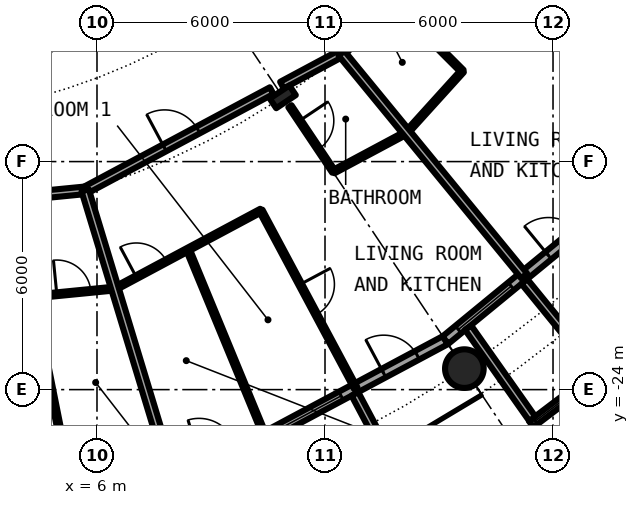
"""IFC4 building model, lengths in metres.
Left out: names, types, materials, properties, quantities, classifications, styles, units other than length and angle.
Written with IfcOpenShell. Run it as: python <this file> out.ifc"""

import sys

from ifc_helpers import new_model, si_unit, direction, frame, frame_2d, origin, origin_2d, place, context, subcontext, project, spatial, rectangle, circle, hollow_circle, i_section, extrude, element, fill, save


model = new_model("IFC4")
c1 = context("Model", 3, precision=1e-05, world=origin(), true_north=direction((0.0, 1.0)))
c2 = subcontext(c1, "Body", "Model", "MODEL_VIEW")
j1 = project(units=[si_unit("LENGTHUNIT", "METRE"), si_unit("PLANEANGLEUNIT", "RADIAN")], contexts=[c1])
p1 = place(None, origin())
s1 = spatial("IfcSite", under=j1, at=p1, CompositionType="ELEMENT")
p2 = place(p1, origin())
s2 = spatial("IfcBuilding", under=s1, at=p2, CompositionType="ELEMENT")
p3 = place(p2, frame((0.0, 0.0, 47.2)))
s3 = spatial("IfcBuildingStorey", under=s2, at=p3, CompositionType="ELEMENT", Elevation=47.2)
p4 = place(p3, frame((15.667, -23.448, 0.0), z_axis=(0.0, 0.0, 1.0), x_axis=(1.0, 0.0, 0.0)))
e1 = element("IfcColumn", 1, at=p4, inside=s3, PredefinedType="COLUMN", context=c2, shape_type="SweptSolid", body=[
    extrude(hollow_circle(Radius=0.508, WallThickness=0.05, at=origin_2d()), origin(), (0.0, 0.0, 1.0), 3.05),
])
p5 = place(p3, frame((10.889, -16.297, 0.0), z_axis=(0.0, 0.0, 1.0), x_axis=(0.55557023302, -0.831469612303, 0.0)))
e2 = element("IfcColumn", 2, at=p5, inside=s3, PredefinedType="COLUMN", context=c2, shape_type="SweptSolid", body=[
    extrude(i_section(OverallWidth=0.305, OverallDepth=0.62, WebThickness=0.021, FlangeThickness=0.04, FilletRadius=0.027, at=origin_2d()), origin(), (0.0, 0.0, 1.0), 3.05),
])
p6 = place(p3, frame((10.447, -25.222, 0.0), z_axis=(0.0, 0.0, 1.0), x_axis=(0.881915646801, 0.471407246368, 0.0)))
e3 = element("IfcWall", 3, at=p6, inside=s3, PredefinedType="SOLIDWALL", context=c2, shape_type="SweptSolid", body=[
    extrude(rectangle(XDim=5.352, YDim=0.25, at=frame_2d((2.676, 0.0))), origin(), (0.0, 0.0, 1.0), 2.7),
])
p7 = place(p6, frame((0.441, 0.0, 0.3)))
e4 = element("IfcOpeningElement", 4, at=p7, cuts=e3, PredefinedType="OPENING", context=c2, shape_type="SweptSolid", body=[
    extrude(rectangle(XDim=1.8, YDim=2.1, at=frame_2d((0.9, 1.05))), frame((0.0, 0.135, 0.0), z_axis=(0.0, -1.0, 0.0), x_axis=(1.0, 0.0, 0.0)), (0.0, 0.0, 1.0), 0.27),
])
p8 = place(p6, frame((3.51, 0.0, 0.0)))
e5 = element("IfcOpeningElement", 5, at=p8, cuts=e3, PredefinedType="OPENING", context=c2, shape_type="SweptSolid", body=[
    extrude(rectangle(XDim=1.0, YDim=2.2, at=frame_2d((0.5, 1.1))), frame((0.0, 0.135, 0.0), z_axis=(0.0, -1.0, 0.0), x_axis=(1.0, 0.0, 0.0)), (0.0, 0.0, 1.0), 0.27),
])
p9 = place(p3, frame((12.787, -24.113, -0.03), z_axis=(0.0, 0.0, 1.0), x_axis=(0.468365282436, -0.883534924159, 0.0)))
e6 = element("IfcWall", 6, at=p9, inside=s3, PredefinedType="SOLIDWALL", context=c2, shape_type="SweptSolid", body=[
    extrude(rectangle(XDim=3.006, YDim=0.2, at=frame_2d((1.503, 0.0))), origin(), (0.0, 0.0, 1.0), 2.73),
])
p10 = place(p3, frame((15.167, -22.699, 0.0), z_axis=(0.0, 0.0, 1.0), x_axis=(0.773019449054, 0.634382322723, 0.0)))
e7 = element("IfcWall", 7, at=p10, inside=s3, PredefinedType="SOLIDWALL", context=c2, shape_type="SweptSolid", body=[
    extrude(rectangle(XDim=5.352, YDim=0.25, at=frame_2d((2.676, 0.0))), origin(), (0.0, 0.0, 1.0), 2.7),
])
p11 = place(p10, frame((0.441, 0.0, 0.3)))
e8 = element("IfcOpeningElement", 8, at=p11, cuts=e7, PredefinedType="OPENING", context=c2, shape_type="SweptSolid", body=[
    extrude(rectangle(XDim=1.8, YDim=2.1, at=frame_2d((0.9, 1.05))), frame((0.0, 0.135, 0.0), z_axis=(0.0, -1.0, 0.0), x_axis=(1.0, 0.0, 0.0)), (0.0, 0.0, 1.0), 0.27),
])
p12 = place(p10, frame((3.51, 0.0, 0.0)))
e9 = element("IfcOpeningElement", 9, at=p12, cuts=e7, PredefinedType="OPENING", context=c2, shape_type="SweptSolid", body=[
    extrude(rectangle(XDim=1.0, YDim=2.2, at=frame_2d((0.5, 1.1))), frame((0.0, 0.135, 0.0), z_axis=(0.0, -1.0, 0.0), x_axis=(1.0, 0.0, 0.0)), (0.0, 0.0, 1.0), 0.27),
])
p13 = place(p3, frame((17.427, -24.909, -0.03), z_axis=(0.0, 0.0, 1.0), x_axis=(0.796842165306, 0.60418752353, 0.0)))
e10 = element("IfcWall", 10, at=p13, inside=s3, PredefinedType="SOLIDWALL", context=c2, shape_type="SweptSolid", body=[
    extrude(rectangle(XDim=2.337, YDim=0.2, at=frame_2d((1.168, 0.0))), origin(), (0.0, 0.0, 1.0), 2.73),
])
p14 = place(p13, frame((0.128, 0.0, 0.33)))
e11 = element("IfcOpeningElement", 11, at=p14, cuts=e10, PredefinedType="OPENING", context=c2, shape_type="SweptSolid", body=[
    extrude(circle(Radius=1.04, at=frame_2d((1.04, 1.04))), frame((0.0, 0.11, 0.0), z_axis=(0.0, -1.0, 0.0), x_axis=(1.0, 0.0, 0.0)), (0.0, 0.0, 1.0), 0.22),
])
p15 = place(p3, frame((15.765, -22.37, -0.03), z_axis=(0.0, 0.0, 1.0), x_axis=(0.576274612209, -0.817256123454, 0.0)))
e12 = element("IfcWall", 12, at=p15, inside=s3, PredefinedType="SOLIDWALL", context=c2, shape_type="SweptSolid", body=[
    extrude(rectangle(XDim=2.933, YDim=0.2, at=frame_2d((1.466, 0.0))), origin(), (0.0, 0.0, 1.0), 2.73),
])
p16 = place(p3, frame((17.246, -21.155, -0.03), z_axis=(0.0, 0.0, 1.0), x_axis=(0.631741648902, -0.775179004516, 0.0)))
e13 = element("IfcWall", 13, at=p16, inside=s3, PredefinedType="SOLIDWALL", context=c2, shape_type="SweptSolid", body=[
    extrude(rectangle(XDim=3.006, YDim=0.2, at=frame_2d((1.503, 0.0))), origin(), (0.0, 0.0, 1.0), 2.73),
])
p17 = place(p3, frame((14.153, -17.234, 0.0), z_axis=(0.0, 0.0, 1.0), x_axis=(0.671144831591, 0.741326254107, 0.0)))
e14 = element("IfcWall", 14, at=p17, inside=s3, PredefinedType="PARTITIONING", context=c2, shape_type="SweptSolid", body=[
    extrude(rectangle(XDim=2.181, YDim=0.1, at=frame_2d((1.091, 0.0))), origin(), (0.0, 0.0, 1.0), 2.7),
])
p18 = place(p3, frame((2.144, -21.766, 0.0), z_axis=(0.0, 0.0, 1.0), x_axis=(0.995192120883, 0.097942036599, 0.0)))
e15 = element("IfcWall", 15, at=p18, inside=s3, PredefinedType="PARTITIONING", context=c2, shape_type="SweptSolid", body=[
    extrude(rectangle(XDim=4.35, YDim=0.1, at=frame_2d((2.175, 0.0))), origin(), (0.0, 0.0, 1.0), 2.7),
])
p19 = place(p18, frame((2.812, 0.0, 0.0)))
e16 = element("IfcOpeningElement", 16, at=p19, cuts=e15, PredefinedType="OPENING", context=c2, shape_type="SweptSolid", body=[
    extrude(rectangle(XDim=0.9, YDim=2.3, at=frame_2d((0.45, 1.15))), frame((0.0, 0.06, 0.0), z_axis=(0.0, -1.0, 0.0), x_axis=(1.0, 0.0, 0.0)), (0.0, 0.0, 1.0), 0.12),
])
p20 = place(p3, frame((6.478, -21.34, 0.0), z_axis=(0.0, 0.0, 1.0), x_axis=(0.881765663848, 0.471687729392, 0.0)))
e17 = element("IfcWall", 17, at=p20, inside=s3, PredefinedType="PARTITIONING", context=c2, shape_type="SweptSolid", body=[
    extrude(rectangle(XDim=4.355, YDim=0.1, at=frame_2d((2.177, 0.0))), origin(), (0.0, 0.0, 1.0), 2.7),
])
p21 = place(p20, frame((0.633, 0.0, 0.0)))
e18 = element("IfcOpeningElement", 18, at=p21, cuts=e17, PredefinedType="OPENING", context=c2, shape_type="SweptSolid", body=[
    extrude(rectangle(XDim=0.9, YDim=2.3, at=frame_2d((0.45, 1.15))), frame((0.0, 0.06, 0.0), z_axis=(0.0, -1.0, 0.0), x_axis=(1.0, 0.0, 0.0)), (0.0, 0.0, 1.0), 0.12),
])
p22 = place(p3, frame((12.229, -18.264, 0.0), z_axis=(0.0, 0.0, 1.0), x_axis=(0.881786813167, 0.471648191055, 0.0)))
e19 = element("IfcWall", 19, at=p22, inside=s3, PredefinedType="PARTITIONING", context=c2, shape_type="SweptSolid", body=[
    extrude(rectangle(XDim=2.175, YDim=0.1, at=frame_2d((1.087, 0.0))), origin(), (0.0, 0.0, 1.0), 2.7),
])
p23 = place(p3, frame((12.434, -15.151, 0.0), z_axis=(0.0, 0.0, 1.0), x_axis=(0.671514934772, 0.740991020444, 0.0)))
e20 = element("IfcWall", 20, at=p23, inside=s3, PredefinedType="PARTITIONING", context=c2, shape_type="SweptSolid", body=[
    extrude(rectangle(XDim=5.598, YDim=0.2, at=frame_2d((2.799, 0.0))), origin(), (0.0, 0.0, 1.0), 2.38),
])
p24 = place(p23, frame((3.305, 0.0, 0.0)))
e21 = element("IfcOpeningElement", 21, at=p24, cuts=e20, PredefinedType="OPENING", context=c2, shape_type="SweptSolid", body=[
    extrude(rectangle(XDim=1.0, YDim=2.3, at=frame_2d((0.5, 1.15))), frame((0.0, 0.11, 0.0), z_axis=(0.0, -1.0, 0.0), x_axis=(1.0, 0.0, 0.0)), (0.0, 0.0, 1.0), 0.22),
])
p25 = place(p3, frame((3.921, -18.93, 0.0), z_axis=(0.0, 0.0, 1.0), x_axis=(0.995207057161, 0.097790149696, 0.0)))
e22 = element("IfcWall", 22, at=p25, inside=s3, PredefinedType="PARTITIONING", context=c2, shape_type="SweptSolid", body=[
    extrude(rectangle(XDim=1.778, YDim=0.2, at=frame_2d((0.889, 0.0))), origin(), (0.0, 0.0, 1.0), 2.38),
])
p26 = place(p3, frame((5.69, -18.756, 0.0), z_axis=(0.0, 0.0, 1.0), x_axis=(0.881866548297, 0.471499089072, 0.0)))
e23 = element("IfcWall", 23, at=p26, inside=s3, PredefinedType="PARTITIONING", context=c2, shape_type="SweptSolid", body=[
    extrude(rectangle(XDim=5.563, YDim=0.2, at=frame_2d((2.782, 0.0))), origin(), (0.0, 0.0, 1.0), 2.38),
])
p27 = place(p26, frame((2.368, 0.0, 0.0)))
e24 = element("IfcOpeningElement", 24, at=p27, cuts=e23, PredefinedType="OPENING", context=c2, shape_type="SweptSolid", body=[
    extrude(rectangle(XDim=1.0, YDim=2.3, at=frame_2d((0.5, 1.15))), frame((0.0, 0.11, 0.0), z_axis=(0.0, -1.0, 0.0), x_axis=(1.0, 0.0, 0.0)), (0.0, 0.0, 1.0), 0.22),
])
p28 = place(p3, frame((10.867, -15.989, 0.0), z_axis=(0.0, 0.0, 1.0), x_axis=(0.881596178172, 0.472004426496, 0.0)))
e25 = element("IfcWall", 25, at=p28, inside=s3, PredefinedType="PARTITIONING", context=c2, shape_type="SweptSolid", body=[
    extrude(rectangle(XDim=1.78, YDim=0.2, at=frame_2d((0.89, 0.0))), origin(), (0.0, 0.0, 1.0), 2.38),
])
p29 = place(p3, frame((1.656, -16.819, 0.0), z_axis=(0.0, 0.0, 1.0), x_axis=(0.857773470126, 0.514027892189, 0.0)))
e26 = element("IfcWall", 26, at=p29, inside=s3, PredefinedType="PARTITIONING", context=c2, shape_type="SweptSolid", body=[
    extrude(rectangle(XDim=14.429, YDim=0.2, at=frame_2d((7.215, 0.0))), origin(), (0.0, 0.0, 1.0), 2.7),
])
p30 = place(p29, frame((4.318, 0.0, 0.0)))
e27 = element("IfcOpeningElement", 27, at=p30, cuts=e26, PredefinedType="OPENING", context=c2, shape_type="SweptSolid", body=[
    extrude(rectangle(XDim=1.0, YDim=2.3, at=frame_2d((0.5, 1.15))), frame((0.0, 0.11, 0.0), z_axis=(0.0, -1.0, 0.0), x_axis=(1.0, 0.0, 0.0)), (0.0, 0.0, 1.0), 0.22),
])
p31 = place(p3, frame((4.309, -21.553, 0.0), z_axis=(0.0, 0.0, 1.0), x_axis=(0.195899255693, -0.980624026638, 0.0)))
e28 = element("IfcWall", 28, at=p31, inside=s3, PredefinedType="PARTITIONING", context=c2, shape_type="SweptSolid", body=[
    extrude(rectangle(XDim=5.196, YDim=0.1, at=frame_2d((2.598, 0.0))), origin(), (0.0, 0.0, 1.0), 2.7),
])
p32 = place(p3, frame((5.689, -18.756, 0.0), z_axis=(0.0, 0.0, 1.0), x_axis=(0.290294523619, -0.956937348815, 0.0)))
e29 = element("IfcWall", 29, at=p32, inside=s3, PredefinedType="PARTITIONING", context=c2, shape_type="SweptSolid", body=[
    extrude(rectangle(XDim=7.575, YDim=0.2, at=frame_2d((3.788, 0.0))), origin(), (0.0, 0.0, 1.0), 2.7),
])
p33 = place(p3, frame((8.392, -20.314, 0.0), z_axis=(0.0, 0.0, 1.0), x_axis=(0.381673756215, -0.924297107978, 0.0)))
e30 = element("IfcWall", 30, at=p33, inside=s3, PredefinedType="PARTITIONING", context=c2, shape_type="SweptSolid", body=[
    extrude(rectangle(XDim=5.195, YDim=0.1, at=frame_2d((2.598, 0.0))), origin(), (0.0, 0.0, 1.0), 2.7),
])
p34 = place(p3, frame((10.31, -19.289, 0.0), z_axis=(0.0, 0.0, 1.0), x_axis=(0.47140999111, -0.881914179658, 0.0)))
e31 = element("IfcWall", 31, at=p34, inside=s3, PredefinedType="PARTITIONING", context=c2, shape_type="SweptSolid", body=[
    extrude(rectangle(XDim=5.303, YDim=0.1, at=frame_2d((2.652, 0.0))), origin(), (0.0, 0.0, 1.0), 2.7),
])
p35 = place(p34, frame((2.202, 0.0, 0.0)))
e32 = element("IfcOpeningElement", 32, at=p35, cuts=e31, PredefinedType="OPENING", context=c2, shape_type="SweptSolid", body=[
    extrude(rectangle(XDim=0.9, YDim=2.3, at=frame_2d((0.45, 1.15))), frame((0.0, 0.06, 0.0), z_axis=(0.0, -1.0, 0.0), x_axis=(1.0, 0.0, 0.0)), (0.0, 0.0, 1.0), 0.12),
])
p36 = place(p3, frame((11.077, -16.544, 0.0), z_axis=(0.0, 0.0, 1.0), x_axis=(0.556522278225, -0.830832687031, 0.0)))
e33 = element("IfcWall", 33, at=p36, inside=s3, PredefinedType="PARTITIONING", context=c2, shape_type="SweptSolid", body=[
    extrude(rectangle(XDim=2.07, YDim=0.1, at=frame_2d((1.035, 0.0))), origin(), (0.0, 0.0, 1.0), 2.7),
])
p37 = place(p36, frame((0.458, 0.0, 0.0)))
e34 = element("IfcOpeningElement", 34, at=p37, cuts=e33, PredefinedType="OPENING", context=c2, shape_type="SweptSolid", body=[
    extrude(rectangle(XDim=0.9, YDim=2.3, at=frame_2d((0.45, 1.15))), frame((0.0, 0.06, 0.0), z_axis=(0.0, -1.0, 0.0), x_axis=(1.0, 0.0, 0.0)), (0.0, 0.0, 1.0), 0.12),
])
p38 = place(p3, frame((12.434, -15.151, 0.0), z_axis=(0.0, 0.0, 1.0), x_axis=(0.634381303318, -0.773020285633, 0.0)))
e35 = element("IfcWall", 35, at=p38, inside=s3, PredefinedType="PARTITIONING", context=c2, shape_type="SweptSolid", body=[
    extrude(rectangle(XDim=7.576, YDim=0.2, at=frame_2d((3.788, 0.0))), origin(), (0.0, 0.0, 1.0), 2.7),
])
p39 = place(p3, frame((13.722, -13.73, 0.0), z_axis=(0.0, 0.0, 1.0), x_axis=(0.706741540154, -0.707471833659, 0.0)))
e36 = element("IfcWall", 36, at=p39, inside=s3, PredefinedType="PARTITIONING", context=c2, shape_type="SweptSolid", body=[
    extrude(rectangle(XDim=2.674, YDim=0.1, at=frame_2d((1.337, 0.0))), origin(), (0.0, 0.0, 1.0), 2.7),
])
p40 = place(p39, frame((0.887, 0.0, 0.0)))
e37 = element("IfcOpeningElement", 37, at=p40, cuts=e36, PredefinedType="OPENING", context=c2, shape_type="SweptSolid", body=[
    extrude(rectangle(XDim=0.9, YDim=2.3, at=frame_2d((0.45, 1.15))), frame((0.0, 0.06, 0.0), z_axis=(0.0, -1.0, 0.0), x_axis=(1.0, 0.0, 0.0)), (0.0, 0.0, 1.0), 0.12),
])
p41 = place(p3, frame((16.555, -11.061, 0.0), z_axis=(0.0, 0.0, 1.0), x_axis=(0.831465568067, -0.555576285599, 0.0)))
e38 = element("IfcWall", 38, at=p41, inside=s3, PredefinedType="PARTITIONING", context=c2, shape_type="SweptSolid", body=[
    extrude(rectangle(XDim=7.264, YDim=0.2, at=frame_2d((3.632, 0.0))), origin(), (0.0, 0.0, 1.0), 2.7),
])
p42 = place(p3, frame((17.077, -14.006, 0.0), z_axis=(0.0, 0.0, 1.0), x_axis=(0.77326214499, -0.634086472908, 0.0)))
e39 = element("IfcWall", 39, at=p42, inside=s3, PredefinedType="PARTITIONING", context=c2, shape_type="SweptSolid", body=[
    extrude(rectangle(XDim=5.089, YDim=0.1, at=frame_2d((2.544, 0.0))), origin(), (0.0, 0.0, 1.0), 2.7),
])
p43 = place(p42, frame((2.094, 0.0, 0.0)))
e40 = element("IfcOpeningElement", 40, at=p43, cuts=e39, PredefinedType="OPENING", context=c2, shape_type="SweptSolid", body=[
    extrude(rectangle(XDim=0.9, YDim=2.3, at=frame_2d((0.45, 1.15))), frame((0.0, 0.06, 0.0), z_axis=(0.0, -1.0, 0.0), x_axis=(1.0, 0.0, 0.0)), (0.0, 0.0, 1.0), 0.12),
])
p44 = place(p7, origin())
e41 = element("IfcWindow", 41, at=p44, inside=s3, PartitioningType="SINGLE_PANEL", PredefinedType="WINDOW", context=c2, shape_type="SweptSolid", body=[
    extrude(rectangle(XDim=1.8, YDim=2.1, at=frame_2d((0.9, 1.05))), frame((0.0, 0.03, 0.0), z_axis=(0.0, -1.0, 0.0), x_axis=(1.0, 0.0, 0.0)), (0.0, 0.0, 1.0), 0.06),
])
fill(e4, e41)
p45 = place(p8, origin())
e42 = element("IfcDoor", 42, at=p45, inside=s3, OperationType="SINGLE_SWING_LEFT", PredefinedType="DOOR", context=c2, shape_type="SweptSolid", body=[
    extrude(rectangle(XDim=1.0, YDim=2.2, at=frame_2d((0.5, 1.1))), frame((0.0, 0.025, 0.0), z_axis=(0.0, -1.0, 0.0), x_axis=(1.0, 0.0, 0.0)), (0.0, 0.0, 1.0), 0.05),
])
fill(e5, e42)
p46 = place(p11, origin())
e43 = element("IfcWindow", 43, at=p46, inside=s3, PartitioningType="SINGLE_PANEL", PredefinedType="WINDOW", context=c2, shape_type="SweptSolid", body=[
    extrude(rectangle(XDim=1.8, YDim=2.1, at=frame_2d((0.9, 1.05))), frame((0.0, 0.03, 0.0), z_axis=(0.0, -1.0, 0.0), x_axis=(1.0, 0.0, 0.0)), (0.0, 0.0, 1.0), 0.06),
])
fill(e8, e43)
p47 = place(p14, origin())
e44 = element("IfcWindow", 44, at=p47, inside=s3, PartitioningType="SINGLE_PANEL", PredefinedType="WINDOW", context=c2, shape_type="SweptSolid", body=[
    extrude(circle(Radius=1.04, at=frame_2d((1.04, 1.04))), frame((0.0, 0.03, 0.0), z_axis=(0.0, -1.0, 0.0), x_axis=(1.0, 0.0, 0.0)), (0.0, 0.0, 1.0), 0.06),
])
fill(e11, e44)
p48 = place(p12, origin())
e45 = element("IfcDoor", 45, at=p48, inside=s3, OperationType="SINGLE_SWING_LEFT", PredefinedType="DOOR", context=c2, shape_type="SweptSolid", body=[
    extrude(rectangle(XDim=1.0, YDim=2.2, at=frame_2d((0.5, 1.1))), frame((0.0, 0.025, 0.0), z_axis=(0.0, -1.0, 0.0), x_axis=(1.0, 0.0, 0.0)), (0.0, 0.0, 1.0), 0.05),
])
fill(e9, e45)
p49 = place(p19, origin())
e46 = element("IfcDoor", 46, at=p49, inside=s3, OperationType="SINGLE_SWING_RIGHT", PredefinedType="DOOR", context=c2, shape_type="SweptSolid", body=[
    extrude(rectangle(XDim=0.9, YDim=2.3, at=frame_2d((0.45, 1.15))), frame((0.0, 0.025, 0.0), z_axis=(0.0, -1.0, 0.0), x_axis=(1.0, 0.0, 0.0)), (0.0, 0.0, 1.0), 0.05),
])
fill(e16, e46)
p50 = place(p27, origin())
e47 = element("IfcDoor", 47, at=p50, inside=s3, OperationType="SINGLE_SWING_RIGHT", PredefinedType="DOOR", context=c2, shape_type="SweptSolid", body=[
    extrude(rectangle(XDim=1.0, YDim=2.3, at=frame_2d((0.5, 1.15))), frame((0.0, 0.025, 0.0), z_axis=(0.0, -1.0, 0.0), x_axis=(1.0, 0.0, 0.0)), (0.0, 0.0, 1.0), 0.05),
])
fill(e24, e47)
p51 = place(p37, origin())
e48 = element("IfcDoor", 48, at=p51, inside=s3, OperationType="SINGLE_SWING_LEFT", PredefinedType="DOOR", context=c2, shape_type="SweptSolid", body=[
    extrude(rectangle(XDim=0.9, YDim=2.3, at=frame_2d((0.45, 1.15))), frame((0.0, 0.025, 0.0), z_axis=(0.0, -1.0, 0.0), x_axis=(1.0, 0.0, 0.0)), (0.0, 0.0, 1.0), 0.05),
])
fill(e34, e48)
p52 = place(p35, origin())
e49 = element("IfcDoor", 49, at=p52, inside=s3, OperationType="SINGLE_SWING_RIGHT", PredefinedType="DOOR", context=c2, shape_type="SweptSolid", body=[
    extrude(rectangle(XDim=0.9, YDim=2.3, at=frame_2d((0.45, 1.15))), frame((0.0, 0.025, 0.0), z_axis=(0.0, -1.0, 0.0), x_axis=(1.0, 0.0, 0.0)), (0.0, 0.0, 1.0), 0.05),
])
fill(e32, e49)
p53 = place(p21, origin())
e50 = element("IfcDoor", 50, at=p53, inside=s3, OperationType="SINGLE_SWING_LEFT", PredefinedType="DOOR", context=c2, shape_type="SweptSolid", body=[
    extrude(rectangle(XDim=0.9, YDim=2.3, at=frame_2d((0.45, 1.15))), frame((0.0, 0.025, 0.0), z_axis=(0.0, -1.0, 0.0), x_axis=(1.0, 0.0, 0.0)), (0.0, 0.0, 1.0), 0.05),
])
fill(e18, e50)
save(model, sys.argv[1])
